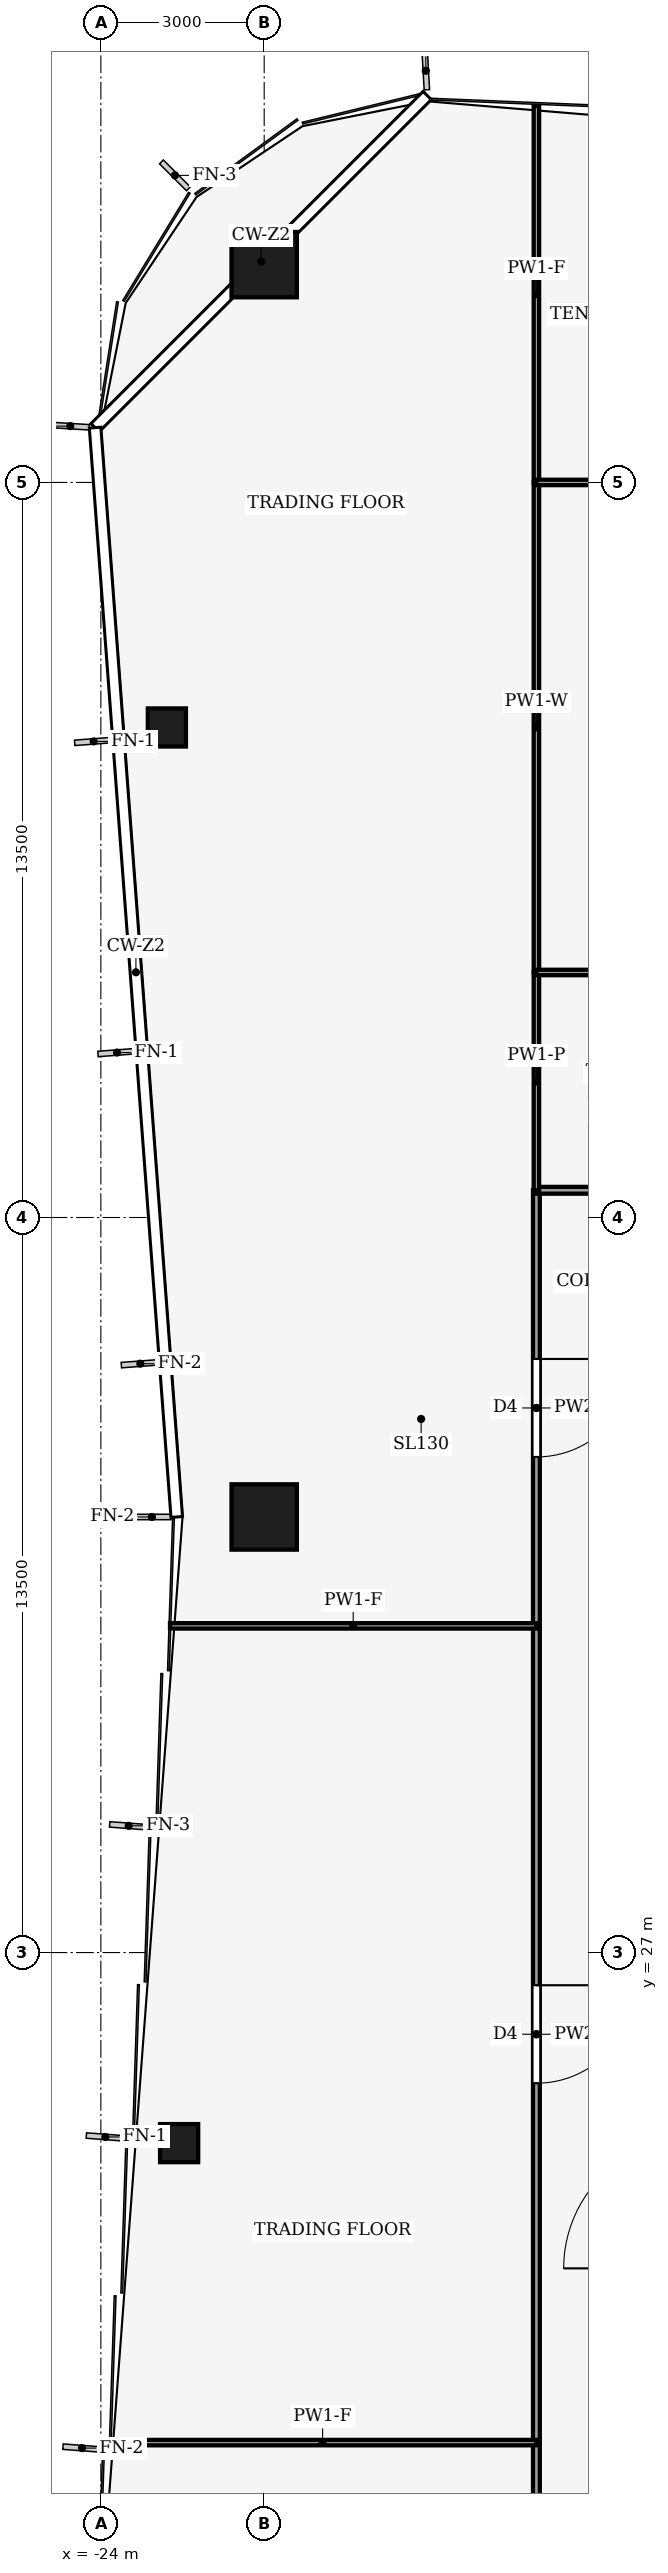
"""IFC4 building model, lengths in metres.
Left out: names, types, materials, properties, quantities, classifications, styles, units other than length and angle.
Written with IfcOpenShell. Run it as: python <this file> out.ifc"""

import sys

from ifc_helpers import new_model, si_unit, direction, frame, frame_2d, origin, origin_2d, place, context, subcontext, project, spatial, rectangle, hollow_rectangle, extrude, element, fill, save


model = new_model("IFC4")
c1 = context("Model", 3, precision=1e-05, world=origin(), true_north=direction((0.0, 1.0)))
c2 = subcontext(c1, "Body", "Model", "MODEL_VIEW")
j1 = project(units=[si_unit("LENGTHUNIT", "METRE"), si_unit("PLANEANGLEUNIT", "RADIAN")], contexts=[c1])
p1 = place(None, origin())
s1 = spatial("IfcSite", under=j1, at=p1, CompositionType="ELEMENT")
p2 = place(p1, origin())
s2 = spatial("IfcBuilding", under=s1, at=p2, CompositionType="ELEMENT")
p3 = place(p2, frame((0.0, 0.0, 138.0)))
s3 = spatial("IfcBuildingStorey", under=s2, at=p3, CompositionType="ELEMENT", Elevation=138.0)
for number, where, z_axis, x_axis in (
    (1, (-21.0, 58.0, 0.0), (0.0, 0.0, 1.0), (1.0, 0.0, 0.0)),
    (2, (-21.0, 35.0, 0.0), (0.0, 0.0, 1.0), (1.0, 0.0, 0.0)),
):
    element("IfcColumn", number, at=place(p3, frame(where, z_axis=z_axis, x_axis=x_axis)), inside=s3, PredefinedType="COLUMN", context=c2, shape_type="SweptSolid", body=[
        extrude(hollow_rectangle(XDim=1.2, YDim=1.2, WallThickness=0.07, at=origin_2d()), origin(), (0.0, 0.0, 1.0), 4.0),
    ])
for number, where, z_axis, x_axis in (
    (3, (-22.562, 23.5, 0.0), (0.0, 0.0, 1.0), (1.0, 0.0, 0.0)),
    (4, (-22.788, 49.5, 0.0), (0.0, 0.0, 1.0), (1.0, 0.0, 0.0)),
):
    element("IfcColumn", number, at=place(p3, frame(where, z_axis=z_axis, x_axis=x_axis)), inside=s3, PredefinedType="COLUMN", context=c2, shape_type="SweptSolid", body=[
        extrude(hollow_rectangle(XDim=0.7, YDim=0.7, WallThickness=0.03, at=origin_2d()), origin(), (0.0, 0.0, 1.0), 4.0),
    ])
p4 = place(p3, frame((-16.0, 9.087, 0.0), z_axis=(0.0, 0.0, 1.0), x_axis=(0.0, 1.0, 0.0)))
e5 = element("IfcWall", 5, at=p4, inside=s3, PredefinedType="PARTITIONING", context=c2, shape_type="SweptSolid", body=[
    extrude(rectangle(XDim=8.913, YDim=0.125, at=frame_2d((4.457, 0.0))), origin(), (0.0, 0.0, 1.0), 3.04),
])
p5 = place(p4, frame((4.022, 0.0, 0.0)))
e6 = element("IfcOpeningElement", 6, at=p5, cuts=e5, PredefinedType="OPENING", context=c2, shape_type="SweptSolid", body=[
    extrude(rectangle(XDim=1.0, YDim=2.1, at=frame_2d((0.5, 1.05))), frame((0.0, 0.073, 0.0), z_axis=(0.0, -1.0, 0.0), x_axis=(1.0, 0.0, 0.0)), (0.0, 0.0, 1.0), 0.145),
])
p6 = place(p3, frame((-16.0, 33.0, 0.0), z_axis=(0.0, 0.0, 1.0), x_axis=(0.0, -1.0, 0.0)))
e7 = element("IfcWall", 7, at=p6, inside=s3, PredefinedType="PARTITIONING", context=c2, shape_type="SweptSolid", body=[
    extrude(rectangle(XDim=15.0, YDim=0.125, at=frame_2d((7.5, 0.0))), origin(), (0.0, 0.0, 1.0), 3.48),
])
p7 = place(p6, frame((6.6, 0.0, 0.0)))
e8 = element("IfcOpeningElement", 8, at=p7, cuts=e7, PredefinedType="OPENING", context=c2, shape_type="SweptSolid", body=[
    extrude(rectangle(XDim=1.8, YDim=2.1, at=frame_2d((0.9, 1.05))), frame((0.0, 0.073, 0.0), z_axis=(0.0, -1.0, 0.0), x_axis=(1.0, 0.0, 0.0)), (0.0, 0.0, 1.0), 0.145),
])
p8 = place(p3, frame((-16.0, 41.004, 0.0), z_axis=(0.0, 0.0, 1.0), x_axis=(0.0, -1.0, 0.0)))
e9 = element("IfcWall", 9, at=p8, inside=s3, PredefinedType="PARTITIONING", context=c2, shape_type="SweptSolid", body=[
    extrude(rectangle(XDim=8.004, YDim=0.125, at=frame_2d((4.002, 0.0))), origin(), (0.0, 0.0, 1.0), 3.14),
])
p9 = place(p8, frame((3.102, 0.0, 0.0)))
e10 = element("IfcOpeningElement", 10, at=p9, cuts=e9, PredefinedType="OPENING", context=c2, shape_type="SweptSolid", body=[
    extrude(rectangle(XDim=1.8, YDim=2.1, at=frame_2d((0.9, 1.05))), frame((0.0, 0.073, 0.0), z_axis=(0.0, -1.0, 0.0), x_axis=(1.0, 0.0, 0.0)), (0.0, 0.0, 1.0), 0.145),
])
p10 = place(p3, frame((-16.0, 41.0, 0.0), z_axis=(0.0, 0.0, 1.0), x_axis=(1.0, 0.0, 0.0)))
e11 = element("IfcWall", 11, at=p10, inside=s3, PredefinedType="PARTITIONING", context=c2, shape_type="SweptSolid", body=[
    extrude(rectangle(XDim=4.0, YDim=0.125, at=frame_2d((2.0, 0.0))), origin(), (0.0, 0.0, 1.0), 3.44),
])
p11 = place(p10, frame((1.5, 0.0, 0.0)))
e12 = element("IfcOpeningElement", 12, at=p11, cuts=e11, PredefinedType="OPENING", context=c2, shape_type="SweptSolid", body=[
    extrude(rectangle(XDim=1.0, YDim=2.1, at=frame_2d((0.5, 1.05))), frame((0.0, 0.073, 0.0), z_axis=(0.0, -1.0, 0.0), x_axis=(1.0, 0.0, 0.0)), (0.0, 0.0, 1.0), 0.145),
])
p12 = place(p3, frame((-16.0, 18.0, 0.0), z_axis=(0.0, 0.0, 1.0), x_axis=(-1.0, 0.0, 0.0)))
e13 = element("IfcWall", 13, at=p12, inside=s3, PredefinedType="PARTITIONING", context=c2, shape_type="SweptSolid", body=[
    extrude(rectangle(XDim=7.855, YDim=0.1, at=frame_2d((3.927, 0.0))), origin(), (0.0, 0.0, 1.0), 3.04),
])
p13 = place(p3, frame((-16.0, 33.0, 0.0), z_axis=(0.0, 0.0, 1.0), x_axis=(-1.0, 0.0, 0.0)))
e14 = element("IfcWall", 14, at=p13, inside=s3, PredefinedType="PARTITIONING", context=c2, shape_type="SweptSolid", body=[
    extrude(rectangle(XDim=6.73, YDim=0.1, at=frame_2d((3.365, 0.0))), origin(), (0.0, 0.0, 1.0), 3.04),
])
p14 = place(p3, frame((-16.0, 41.0, 0.0), z_axis=(0.0, 0.0, 1.0), x_axis=(0.0, 1.0, 0.0)))
e15 = element("IfcWall", 15, at=p14, inside=s3, PredefinedType="PARTITIONING", context=c2, shape_type="SweptSolid", body=[
    extrude(rectangle(XDim=4.0, YDim=0.1, at=frame_2d((2.0, 0.0))), origin(), (0.0, 0.0, 1.0), 3.44),
])
p15 = place(p3, frame((-16.0, 45.0, 0.0), z_axis=(0.0, 0.0, 1.0), x_axis=(0.0, 1.0, 0.0)))
e16 = element("IfcWall", 16, at=p15, inside=s3, PredefinedType="PARTITIONING", context=c2, shape_type="SweptSolid", body=[
    extrude(rectangle(XDim=9.0, YDim=0.1, at=frame_2d((4.5, 0.0))), origin(), (0.0, 0.0, 1.0), 3.24),
])
p16 = place(p3, frame((-16.0, 54.0, 0.0), z_axis=(0.0, 0.0, 1.0), x_axis=(0.0, 1.0, 0.0)))
e17 = element("IfcWall", 17, at=p16, inside=s3, PredefinedType="PARTITIONING", context=c2, shape_type="SweptSolid", body=[
    extrude(rectangle(XDim=6.913, YDim=0.1, at=frame_2d((3.457, 0.0))), origin(), (0.0, 0.0, 1.0), 3.04),
])
p17 = place(p3, frame((-11.996, 45.0, 0.0), z_axis=(0.0, 0.0, 1.0), x_axis=(-1.0, 0.0, 0.0)))
e18 = element("IfcWall", 18, at=p17, inside=s3, PredefinedType="PARTITIONING", context=c2, shape_type="SweptSolid", body=[
    extrude(rectangle(XDim=4.004, YDim=0.1, at=frame_2d((2.002, 0.0))), origin(), (0.0, 0.0, 1.0), 3.87),
])
p18 = place(p3, frame((-16.0, 54.0, 0.0), z_axis=(0.0, 0.0, 1.0), x_axis=(1.0, 0.0, 0.0)))
e19 = element("IfcWall", 19, at=p18, inside=s3, PredefinedType="PARTITIONING", context=c2, shape_type="SweptSolid", body=[
    extrude(rectangle(XDim=4.0, YDim=0.1, at=frame_2d((2.0, 0.0))), origin(), (0.0, 0.0, 1.0), 3.87),
])
p19 = place(p18, frame((1.5, 0.0, 0.0)))
e20 = element("IfcOpeningElement", 20, at=p19, cuts=e19, PredefinedType="OPENING", context=c2, shape_type="SweptSolid", body=[
    extrude(rectangle(XDim=1.0, YDim=2.1, at=frame_2d((0.5, 1.05))), frame((0.0, 0.06, 0.0), z_axis=(0.0, -1.0, 0.0), x_axis=(1.0, 0.0, 0.0)), (0.0, 0.0, 1.0), 0.12),
])
p20 = place(p7, origin())
e21 = element("IfcDoor", 21, at=p20, inside=s3, OperationType="DOUBLE_DOOR_SINGLE_SWING", PredefinedType="DOOR", context=c2, shape_type="SweptSolid", body=[
    extrude(rectangle(XDim=1.8, YDim=2.1, at=frame_2d((0.9, 1.05))), frame((0.0, 0.025, 0.0), z_axis=(0.0, -1.0, 0.0), x_axis=(1.0, 0.0, 0.0)), (0.0, 0.0, 1.0), 0.05),
])
fill(e8, e21)
p21 = place(p9, origin())
e22 = element("IfcDoor", 22, at=p21, inside=s3, OperationType="DOUBLE_DOOR_SINGLE_SWING", PredefinedType="DOOR", context=c2, shape_type="SweptSolid", body=[
    extrude(rectangle(XDim=1.8, YDim=2.1, at=frame_2d((0.9, 1.05))), frame((0.0, 0.025, 0.0), z_axis=(0.0, -1.0, 0.0), x_axis=(1.0, 0.0, 0.0)), (0.0, 0.0, 1.0), 0.05),
])
fill(e10, e22)
save(model, sys.argv[1])
